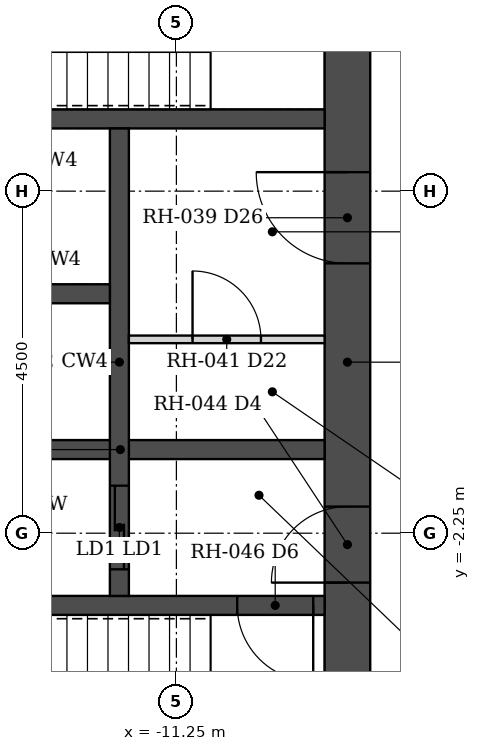
"""IFC4 building model, lengths in metres.
Left out: names, types, materials, properties, quantities, classifications, styles, units other than length and angle.
Written with IfcOpenShell. Run it as: python <this file> out.ifc"""

import sys

from ifc_helpers import new_model, si_unit, direction, frame, frame_2d, origin, place, context, subcontext, project, spatial, rectangle, extrude, element, fill, save


model = new_model("IFC4")
c1 = context("Model", 3, precision=1e-05, world=origin(), true_north=direction((0.0, 1.0)))
c2 = subcontext(c1, "Body", "Model", "MODEL_VIEW")
j1 = project(units=[si_unit("LENGTHUNIT", "METRE"), si_unit("PLANEANGLEUNIT", "RADIAN")], contexts=[c1])
p1 = place(None, origin())
s1 = spatial("IfcSite", under=j1, at=p1, CompositionType="ELEMENT")
p2 = place(p1, origin())
s2 = spatial("IfcBuilding", under=s1, at=p2, CompositionType="ELEMENT")
p3 = place(p2, frame((0.0, 0.0, 103.5)))
s3 = spatial("IfcBuildingStorey", under=s2, at=p3, CompositionType="ELEMENT", Elevation=103.5)
p4 = place(p3, frame((-9.0, -6.45, 0.0), z_axis=(0.0, 0.0, 1.0), x_axis=(0.0, 1.0, 0.0)))
e1 = element("IfcWall", 1, at=p4, inside=s3, PredefinedType="SHEAR", context=c2, shape_type="SweptSolid", body=[
    extrude(rectangle(XDim=12.9, YDim=0.6, at=frame_2d((6.45, 0.0))), origin(), (0.0, 0.0, 1.0), 3.5),
])
p5 = place(p4, frame((3.55, 0.0, 0.0)))
e2 = element("IfcOpeningElement", 2, at=p5, cuts=e1, PredefinedType="OPENING", context=c2, shape_type="SweptSolid", body=[
    extrude(rectangle(XDim=1.0, YDim=2.1, at=frame_2d((0.5, 1.05))), frame((0.0, 0.31, 0.0), z_axis=(0.0, -1.0, 0.0), x_axis=(1.0, 0.0, 0.0)), (0.0, 0.0, 1.0), 0.62),
])
p6 = place(p4, frame((7.75, 0.0, 0.0)))
e3 = element("IfcOpeningElement", 3, at=p6, cuts=e1, PredefinedType="OPENING", context=c2, shape_type="SweptSolid", body=[
    extrude(rectangle(XDim=1.2, YDim=2.1, at=frame_2d((0.6, 1.05))), frame((0.0, 0.31, 0.0), z_axis=(0.0, -1.0, 0.0), x_axis=(1.0, 0.0, 0.0)), (0.0, 0.0, 1.0), 0.62),
])
p7 = place(p4, frame((10.85, 0.0, 0.0)))
e4 = element("IfcOpeningElement", 4, at=p7, cuts=e1, PredefinedType="OPENING", context=c2, shape_type="SweptSolid", body=[
    extrude(rectangle(XDim=1.0, YDim=2.1, at=frame_2d((0.5, 1.05))), frame((0.0, 0.31, 0.0), z_axis=(0.0, -1.0, 0.0), x_axis=(1.0, 0.0, 0.0)), (0.0, 0.0, 1.0), 0.62),
])
p8 = place(p3, frame((-9.3, -3.2, 0.0), z_axis=(0.0, 0.0, 1.0), x_axis=(-1.0, 0.0, 0.0)))
e5 = element("IfcWall", 5, at=p8, inside=s3, PredefinedType="SHEAR", context=c2, shape_type="SweptSolid", body=[
    extrude(rectangle(XDim=8.4, YDim=0.25, at=frame_2d((4.2, 0.0))), origin(), (0.0, 0.0, 1.0), 3.5),
])
p9 = place(p8, frame((0.15, 0.0, 0.0)))
e6 = element("IfcOpeningElement", 6, at=p9, cuts=e5, PredefinedType="OPENING", context=c2, shape_type="SweptSolid", body=[
    extrude(rectangle(XDim=1.0, YDim=2.1, at=frame_2d((0.5, 1.05))), frame((0.0, 0.135, 0.0), z_axis=(0.0, -1.0, 0.0), x_axis=(1.0, 0.0, 0.0)), (0.0, 0.0, 1.0), 0.27),
])
p10 = place(p3, frame((-9.3, 3.2, 0.0), z_axis=(0.0, 0.0, 1.0), x_axis=(-1.0, 0.0, 0.0)))
e7 = element("IfcWall", 7, at=p10, inside=s3, PredefinedType="SHEAR", context=c2, shape_type="SweptSolid", body=[
    extrude(rectangle(XDim=8.4, YDim=0.25, at=frame_2d((4.2, 0.0))), origin(), (0.0, 0.0, 1.0), 3.5),
])
p11 = place(p3, frame((-9.3, -1.15, 0.0), z_axis=(0.0, 0.0, 1.0), x_axis=(-1.0, 0.0, 0.0)))
e8 = element("IfcWall", 8, at=p11, inside=s3, PredefinedType="SHEAR", context=c2, shape_type="SweptSolid", body=[
    extrude(rectangle(XDim=5.375, YDim=0.25, at=frame_2d((2.688, 0.0))), origin(), (0.0, 0.0, 1.0), 3.5),
])
p12 = place(p3, frame((-12.0, -3.075, 0.0), z_axis=(0.0, 0.0, 1.0), x_axis=(0.0, 1.0, 0.0)))
e9 = element("IfcWall", 9, at=p12, inside=s3, PredefinedType="SHEAR", context=c2, shape_type="SweptSolid", body=[
    extrude(rectangle(XDim=6.15, YDim=0.25, at=frame_2d((3.075, 0.0))), origin(), (0.0, 0.0, 1.0), 3.5),
])
p13 = place(p12, frame((0.35, 0.0, 0.0)))
e10 = element("IfcOpeningElement", 10, at=p13, cuts=e9, PredefinedType="OPENING", context=c2, shape_type="SweptSolid", body=[
    extrude(rectangle(XDim=1.1, YDim=2.1, at=frame_2d((0.55, 1.05))), frame((0.0, 0.135, 0.0), z_axis=(0.0, -1.0, 0.0), x_axis=(1.0, 0.0, 0.0)), (0.0, 0.0, 1.0), 0.27),
])
p14 = place(p3, frame((-12.125, 0.9, 0.0), z_axis=(0.0, 0.0, 1.0), x_axis=(-1.0, 0.0, 0.0)))
e11 = element("IfcWall", 11, at=p14, inside=s3, PredefinedType="SHEAR", context=c2, shape_type="SweptSolid", body=[
    extrude(rectangle(XDim=2.55, YDim=0.25, at=frame_2d((1.275, 0.0))), origin(), (0.0, 0.0, 1.0), 3.5),
])
p15 = place(p3, frame((-11.875, 0.3, 0.0), z_axis=(0.0, 0.0, 1.0), x_axis=(1.0, 0.0, 0.0)))
e12 = element("IfcWall", 12, at=p15, inside=s3, PredefinedType="PARTITIONING", context=c2, shape_type="SweptSolid", body=[
    extrude(rectangle(XDim=2.575, YDim=0.1, at=frame_2d((1.288, 0.0))), origin(), (0.0, 0.0, 1.0), 2.279),
])
p16 = place(p15, frame((0.837, 0.0, 0.0)))
e13 = element("IfcOpeningElement", 13, at=p16, cuts=e12, PredefinedType="OPENING", context=c2, shape_type="SweptSolid", body=[
    extrude(rectangle(XDim=0.9, YDim=2.1, at=frame_2d((0.45, 1.05))), frame((0.0, 0.06, 0.0), z_axis=(0.0, -1.0, 0.0), x_axis=(1.0, 0.0, 0.0)), (0.0, 0.0, 1.0), 0.12),
])
p17 = place(p5, origin())
e14 = element("IfcDoor", 14, at=p17, inside=s3, OperationType="SINGLE_SWING_LEFT", PredefinedType="DOOR", context=c2, shape_type="SweptSolid", body=[
    extrude(rectangle(XDim=1.0, YDim=2.1, at=frame_2d((0.5, 1.05))), frame((0.0, 0.025, 0.0), z_axis=(0.0, -1.0, 0.0), x_axis=(1.0, 0.0, 0.0)), (0.0, 0.0, 1.0), 0.05),
])
fill(e2, e14)
p18 = place(p9, origin())
e15 = element("IfcDoor", 15, at=p18, inside=s3, OperationType="SINGLE_SWING_LEFT", PredefinedType="DOOR", context=c2, shape_type="SweptSolid", body=[
    extrude(rectangle(XDim=1.0, YDim=2.1, at=frame_2d((0.5, 1.05))), frame((0.0, 0.025, 0.0), z_axis=(0.0, -1.0, 0.0), x_axis=(1.0, 0.0, 0.0)), (0.0, 0.0, 1.0), 0.05),
])
fill(e6, e15)
p19 = place(p6, origin())
e16 = element("IfcDoor", 16, at=p19, inside=s3, OperationType="SINGLE_SWING_RIGHT", PredefinedType="DOOR", context=c2, shape_type="SweptSolid", body=[
    extrude(rectangle(XDim=1.2, YDim=2.1, at=frame_2d((0.6, 1.05))), frame((0.0, 0.025, 0.0), z_axis=(0.0, -1.0, 0.0), x_axis=(1.0, 0.0, 0.0)), (0.0, 0.0, 1.0), 0.05),
])
fill(e3, e16)
p20 = place(p16, origin())
e17 = element("IfcDoor", 17, at=p20, inside=s3, OperationType="SINGLE_SWING_LEFT", PredefinedType="DOOR", context=c2, shape_type="SweptSolid", body=[
    extrude(rectangle(XDim=0.9, YDim=2.1, at=frame_2d((0.45, 1.05))), frame((0.0, 0.025, 0.0), z_axis=(0.0, -1.0, 0.0), x_axis=(1.0, 0.0, 0.0)), (0.0, 0.0, 1.0), 0.05),
])
fill(e13, e17)
p21 = place(p13, origin())
e18 = element("IfcDoor", 18, at=p21, inside=s3, OperationType="DOUBLE_DOOR_SLIDING", PredefinedType="DOOR", context=c2, shape_type="SweptSolid", body=[
    extrude(rectangle(XDim=1.1, YDim=2.1, at=frame_2d((0.55, 1.05))), frame((0.0, 0.025, 0.0), z_axis=(0.0, -1.0, 0.0), x_axis=(1.0, 0.0, 0.0)), (0.0, 0.0, 1.0), 0.05),
])
fill(e10, e18)
save(model, sys.argv[1])
